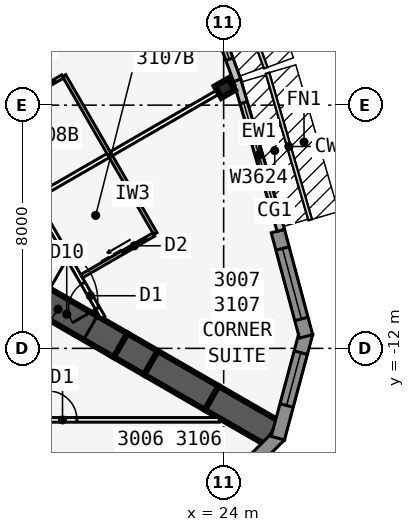
"""IFC4 building model, lengths in metres.
Left out: names, types, materials, properties, quantities, classifications, styles, units other than length and angle.
Written with IfcOpenShell. Run it as: python <this file> out.ifc"""

import sys

from ifc_helpers import new_model, si_unit, direction, frame, frame_2d, origin, origin_2d, place, context, subcontext, project, spatial, polyline, rectangle, i_section, outline, extrude, element, fill, save


model = new_model("IFC4")
c1 = context("Model", 3, precision=1e-05, world=origin(), true_north=direction((0.0, 1.0)))
c2 = subcontext(c1, "Body", "Model", "MODEL_VIEW")
j1 = project(units=[si_unit("LENGTHUNIT", "METRE"), si_unit("PLANEANGLEUNIT", "RADIAN")], contexts=[c1])
p1 = place(None, origin())
s1 = spatial("IfcSite", under=j1, at=p1, CompositionType="ELEMENT")
p2 = place(p1, origin())
s2 = spatial("IfcBuilding", under=s1, at=p2, CompositionType="ELEMENT")
p3 = place(p2, frame((0.0, 0.0, 118.1)))
s3 = spatial("IfcBuildingStorey", under=s2, at=p3, CompositionType="ELEMENT", Elevation=118.1)
p4 = place(p3, frame((16.5, -9.526, 0.0), z_axis=(0.0, 0.0, 1.0), x_axis=(0.866031398331, -0.499989616998, 0.0)))
e1 = element("IfcWall", 1, at=p4, inside=s3, PredefinedType="SHEAR", context=c2, shape_type="SweptSolid", body=[
    extrude(rectangle(XDim=4.746, YDim=0.9, at=frame_2d((2.373, 0.0))), origin(), (0.0, 0.0, 1.0), 3.4),
])
p5 = place(p4, frame((1.8, 0.0, 0.0)))
e2 = element("IfcOpeningElement", 2, at=p5, cuts=e1, PredefinedType="OPENING", context=c2, shape_type="SweptSolid", body=[
    extrude(rectangle(XDim=1.8, YDim=2.13, at=frame_2d((0.9, 1.065))), frame((0.0, 0.46, 0.0), z_axis=(0.0, -1.0, 0.0), x_axis=(1.0, 0.0, 0.0)), (0.0, 0.0, 1.0), 0.92),
])
p6 = place(p3, frame((20.61, -11.899, 0.0), z_axis=(0.0, 0.0, 1.0), x_axis=(0.866009537788, -0.500027479704, 0.0)))
e3 = element("IfcWall", 3, at=p6, inside=s3, PredefinedType="SHEAR", context=c2, shape_type="SweptSolid", body=[
    extrude(rectangle(XDim=1.155, YDim=0.9, at=frame_2d((0.577, 0.0))), origin(), (0.0, 0.0, 1.0), 3.4),
])
for number, where, z_axis, x_axis in (
    (4, (21.61, -12.477, 0.0), (0.0, 0.0, 1.0), (0.866, -0.5, 0.0)),
    (5, (23.61, -13.631, 0.0), (0.0, 0.0, 1.0), (0.866, -0.5, 0.0)),
):
    element("IfcWall", number, at=place(p3, frame(where, z_axis=z_axis, x_axis=x_axis)), inside=s3, PredefinedType="SHEAR", context=c2, shape_type="SweptSolid", body=[
        extrude(rectangle(XDim=2.309, YDim=0.9, at=frame_2d((1.155, 0.0))), origin(), (0.0, 0.0, 1.0), 3.4),
    ])
p7 = place(p3, frame((24.041, -3.44, 0.0), z_axis=(0.0, 0.0, 1.0), x_axis=(-0.5, 0.866025403784, 0.0)))
e6 = element("IfcColumn", 6, at=p7, inside=s3, PredefinedType="COLUMN", context=c2, shape_type="SweptSolid", body=[
    extrude(i_section(OverallWidth=0.437, OverallDepth=0.513, WebThickness=0.061, FlangeThickness=0.097, at=origin_2d()), origin(), (0.0, 0.0, 1.0), 3.4),
])
p8 = place(p3, frame((23.305, -17.388, 0.0), z_axis=(0.0, 0.0, 1.0), x_axis=(0.707106781187, 0.707106781187, 0.0)))
e7 = element("IfcWall", 7, at=p8, inside=s3, PredefinedType="SOLIDWALL", context=c2, shape_type="SweptSolid", body=[
    extrude(outline(polyline([(3.586, 0.225), (3.527, 0.225), (3.035, 0.093), (3.0, 0.225), (0.0, 0.225), (0.0, -0.225), (3.586, -0.225), (3.586, 0.225)])), origin(), (0.0, 0.0, 1.0), 3.235),
])
p9 = place(p8, frame((0.675, 0.0, 0.45)))
e8 = element("IfcOpeningElement", 8, at=p9, cuts=e7, PredefinedType="OPENING", context=c2, shape_type="SweptSolid", body=[
    extrude(rectangle(XDim=1.8, YDim=2.4, at=frame_2d((0.9, 1.2))), frame((0.0, 0.235, 0.0), z_axis=(0.0, -1.0, 0.0), x_axis=(1.0, 0.0, 0.0)), (0.0, 0.0, 1.0), 0.47),
])
p10 = place(p3, frame((25.783, -14.953, 0.0), z_axis=(0.0, 0.0, 1.0), x_axis=(0.258823421857, 0.965924653531, 0.0)))
e9 = element("IfcWall", 9, at=p10, inside=s3, PredefinedType="SOLIDWALL", context=c2, shape_type="SweptSolid", body=[
    extrude(outline(polyline([(3.586, 0.225), (0.586, 0.225), (0.551, 0.093), (0.06, 0.225), (0.0, 0.225), (0.0, -0.225), (3.586, -0.225), (3.586, 0.225)])), origin(), (0.0, 0.0, 1.0), 3.235),
])
p11 = place(p10, frame((1.111, 0.0, 0.45)))
e10 = element("IfcOpeningElement", 10, at=p11, cuts=e9, PredefinedType="OPENING", context=c2, shape_type="SweptSolid", body=[
    extrude(rectangle(XDim=1.8, YDim=2.4, at=frame_2d((0.9, 1.2))), frame((0.0, 0.235, 0.0), z_axis=(0.0, -1.0, 0.0), x_axis=(1.0, 0.0, 0.0)), (0.0, 0.0, 1.0), 0.47),
])
p12 = place(p3, frame((26.711, -11.605, 0.0), z_axis=(0.0, 0.0, 1.0), x_axis=(-0.258823421857, 0.965924653531, 0.0)))
e11 = element("IfcWall", 11, at=p12, inside=s3, PredefinedType="SOLIDWALL", context=c2, shape_type="SweptSolid", body=[
    extrude(rectangle(XDim=3.586, YDim=0.45, at=frame_2d((1.793, 0.0))), origin(), (0.0, 0.0, 1.0), 3.235),
])
p13 = place(p12, frame((0.593, 0.0, 0.45)))
e12 = element("IfcOpeningElement", 12, at=p13, cuts=e11, PredefinedType="OPENING", context=c2, shape_type="SweptSolid", body=[
    extrude(rectangle(XDim=2.4, YDim=2.4, at=frame_2d((1.2, 1.2))), frame((0.0, 0.235, 0.0), z_axis=(0.0, -1.0, 0.0), x_axis=(1.0, 0.0, 0.0)), (0.0, 0.0, 1.0), 0.47),
])
p14 = place(p3, frame((25.88, -8.118, 0.0), z_axis=(0.0, 0.0, 1.0), x_axis=(-0.279528287117, 0.960137457191, 0.0)))
e13 = element("IfcWall", 13, at=p14, inside=s3, PredefinedType="STANDARD", context=c2, shape_type="SweptSolid", body=[
    extrude(rectangle(XDim=5.148, YDim=0.25, at=frame_2d((2.574, 0.0))), origin(), (0.0, 0.0, 1.0), 3.235),
])
p15 = place(p14, frame((0.774, 0.0, 0.45)))
e14 = element("IfcOpeningElement", 14, at=p15, cuts=e13, PredefinedType="OPENING", context=c2, shape_type="SweptSolid", body=[
    extrude(rectangle(XDim=3.6, YDim=2.4, at=frame_2d((1.8, 1.2))), frame((0.0, 0.135, 0.0), z_axis=(0.0, -1.0, 0.0), x_axis=(1.0, 0.0, 0.0)), (0.0, 0.0, 1.0), 0.27),
])
p16 = place(p3, frame((24.444, -3.183, 0.0), z_axis=(0.0, 0.0, 1.0), x_axis=(-0.343225593282, 0.939252996863, 0.0)))
e15 = element("IfcWall", 15, at=p16, inside=s3, PredefinedType="STANDARD", context=c2, shape_type="SweptSolid", body=[
    extrude(rectangle(XDim=5.076, YDim=0.25, at=frame_2d((2.538, 0.0))), origin(), (0.0, 0.0, 1.0), 3.235),
])
p17 = place(p16, frame((0.738, 0.0, 0.45)))
e16 = element("IfcOpeningElement", 16, at=p17, cuts=e15, PredefinedType="OPENING", context=c2, shape_type="SweptSolid", body=[
    extrude(rectangle(XDim=3.6, YDim=2.4, at=frame_2d((1.8, 1.2))), frame((0.0, 0.135, 0.0), z_axis=(0.0, -1.0, 0.0), x_axis=(1.0, 0.0, 0.0)), (0.0, 0.0, 1.0), 0.27),
])
p18 = place(p3, frame((-23.857, -14.351, 0.0), z_axis=(0.0, 0.0, 1.0), x_axis=(1.0, 0.0, 0.0)))
e17 = element("IfcWall", 17, at=p18, inside=s3, PredefinedType="PARTITIONING", context=c2, shape_type="SweptSolid", body=[
    extrude(rectangle(XDim=47.714, YDim=0.15, at=frame_2d((23.857, 0.0))), origin(), (0.0, 0.0, 1.0), 3.235),
])
p19 = place(p18, frame((4.682, 0.0, 0.0)))
e18 = element("IfcOpeningElement", 18, at=p19, cuts=e17, PredefinedType="OPENING", context=c2, shape_type="SweptSolid", body=[
    extrude(rectangle(XDim=0.95, YDim=2.13, at=frame_2d((0.475, 1.065))), frame((0.0, 0.085, 0.0), z_axis=(0.0, -1.0, 0.0), x_axis=(1.0, 0.0, 0.0)), (0.0, 0.0, 1.0), 0.17),
])
p20 = place(p18, frame((11.482, 0.0, 0.0)))
e19 = element("IfcOpeningElement", 19, at=p20, cuts=e17, PredefinedType="OPENING", context=c2, shape_type="SweptSolid", body=[
    extrude(rectangle(XDim=0.95, YDim=2.13, at=frame_2d((0.475, 1.065))), frame((0.0, 0.085, 0.0), z_axis=(0.0, -1.0, 0.0), x_axis=(1.0, 0.0, 0.0)), (0.0, 0.0, 1.0), 0.17),
])
p21 = place(p18, frame((16.482, 0.0, 0.0)))
e20 = element("IfcOpeningElement", 20, at=p21, cuts=e17, PredefinedType="OPENING", context=c2, shape_type="SweptSolid", body=[
    extrude(rectangle(XDim=0.95, YDim=2.13, at=frame_2d((0.475, 1.065))), frame((0.0, 0.085, 0.0), z_axis=(0.0, -1.0, 0.0), x_axis=(1.0, 0.0, 0.0)), (0.0, 0.0, 1.0), 0.17),
])
p22 = place(p18, frame((21.482, 0.0, 0.0)))
e21 = element("IfcOpeningElement", 21, at=p22, cuts=e17, PredefinedType="OPENING", context=c2, shape_type="SweptSolid", body=[
    extrude(rectangle(XDim=0.95, YDim=2.13, at=frame_2d((0.475, 1.065))), frame((0.0, 0.085, 0.0), z_axis=(0.0, -1.0, 0.0), x_axis=(1.0, 0.0, 0.0)), (0.0, 0.0, 1.0), 0.17),
])
p23 = place(p18, frame((25.857, 0.0, 0.0)))
e22 = element("IfcOpeningElement", 22, at=p23, cuts=e17, PredefinedType="OPENING", context=c2, shape_type="SweptSolid", body=[
    extrude(rectangle(XDim=1.0, YDim=2.13, at=frame_2d((0.5, 1.065))), frame((0.0, 0.085, 0.0), z_axis=(0.0, -1.0, 0.0), x_axis=(1.0, 0.0, 0.0)), (0.0, 0.0, 1.0), 0.17),
])
p24 = place(p18, frame((32.082, 0.0, 0.0)))
e23 = element("IfcOpeningElement", 23, at=p24, cuts=e17, PredefinedType="OPENING", context=c2, shape_type="SweptSolid", body=[
    extrude(rectangle(XDim=0.95, YDim=2.13, at=frame_2d((0.475, 1.065))), frame((0.0, 0.085, 0.0), z_axis=(0.0, -1.0, 0.0), x_axis=(1.0, 0.0, 0.0)), (0.0, 0.0, 1.0), 0.17),
])
p25 = place(p18, frame((42.082, 0.0, 0.0)))
e24 = element("IfcOpeningElement", 24, at=p25, cuts=e17, PredefinedType="OPENING", context=c2, shape_type="SweptSolid", body=[
    extrude(rectangle(XDim=0.95, YDim=2.13, at=frame_2d((0.475, 1.065))), frame((0.0, 0.085, 0.0), z_axis=(0.0, -1.0, 0.0), x_axis=(1.0, 0.0, 0.0)), (0.0, 0.0, 1.0), 0.17),
])
p26 = place(p3, frame((20.027, -10.985, 0.0), z_axis=(0.0, 0.0, 1.0), x_axis=(-0.500001677587, 0.866024435227, 0.0)))
e25 = element("IfcWall", 25, at=p26, inside=s3, PredefinedType="PARTITIONING", context=c2, shape_type="SweptSolid", body=[
    extrude(rectangle(XDim=39.054, YDim=0.15, at=frame_2d((19.527, 0.0))), origin(), (0.0, 0.0, 1.0), 3.235),
])
p27 = place(p26, frame((0.352, 0.0, 0.0)))
e26 = element("IfcOpeningElement", 26, at=p27, cuts=e25, PredefinedType="OPENING", context=c2, shape_type="SweptSolid", body=[
    extrude(rectangle(XDim=0.95, YDim=2.13, at=frame_2d((0.475, 1.065))), frame((0.0, 0.085, 0.0), z_axis=(0.0, -1.0, 0.0), x_axis=(1.0, 0.0, 0.0)), (0.0, 0.0, 1.0), 0.17),
])
p28 = place(p26, frame((7.752, 0.0, 0.0)))
e27 = element("IfcOpeningElement", 27, at=p28, cuts=e25, PredefinedType="OPENING", context=c2, shape_type="SweptSolid", body=[
    extrude(rectangle(XDim=0.95, YDim=2.13, at=frame_2d((0.475, 1.065))), frame((0.0, 0.085, 0.0), z_axis=(0.0, -1.0, 0.0), x_axis=(1.0, 0.0, 0.0)), (0.0, 0.0, 1.0), 0.17),
])
p29 = place(p26, frame((17.752, 0.0, 0.0)))
e28 = element("IfcOpeningElement", 28, at=p29, cuts=e25, PredefinedType="OPENING", context=c2, shape_type="SweptSolid", body=[
    extrude(rectangle(XDim=0.95, YDim=2.13, at=frame_2d((0.475, 1.065))), frame((0.0, 0.085, 0.0), z_axis=(0.0, -1.0, 0.0), x_axis=(1.0, 0.0, 0.0)), (0.0, 0.0, 1.0), 0.17),
])
p30 = place(p26, frame((22.152, 0.0, 0.0)))
e29 = element("IfcOpeningElement", 29, at=p30, cuts=e25, PredefinedType="OPENING", context=c2, shape_type="SweptSolid", body=[
    extrude(rectangle(XDim=0.95, YDim=2.13, at=frame_2d((0.475, 1.065))), frame((0.0, 0.085, 0.0), z_axis=(0.0, -1.0, 0.0), x_axis=(1.0, 0.0, 0.0)), (0.0, 0.0, 1.0), 0.17),
])
p31 = place(p26, frame((27.152, 0.0, 0.0)))
e30 = element("IfcOpeningElement", 30, at=p31, cuts=e25, PredefinedType="OPENING", context=c2, shape_type="SweptSolid", body=[
    extrude(rectangle(XDim=0.95, YDim=2.13, at=frame_2d((0.475, 1.065))), frame((0.0, 0.085, 0.0), z_axis=(0.0, -1.0, 0.0), x_axis=(1.0, 0.0, 0.0)), (0.0, 0.0, 1.0), 0.17),
])
p32 = place(p26, frame((36.546, 0.0, 0.0)))
e31 = element("IfcOpeningElement", 31, at=p32, cuts=e25, PredefinedType="OPENING", context=c2, shape_type="SweptSolid", body=[
    extrude(rectangle(XDim=0.95, YDim=2.13, at=frame_2d((0.475, 1.065))), frame((0.0, 0.085, 0.0), z_axis=(0.0, -1.0, 0.0), x_axis=(1.0, 0.0, 0.0)), (0.0, 0.0, 1.0), 0.17),
])
p33 = place(p3, frame((17.829, -7.027, 0.0), z_axis=(0.0, 0.0, 1.0), x_axis=(0.866029804378, 0.499992377871, 0.0)))
e32 = element("IfcWall", 32, at=p33, inside=s3, PredefinedType="PARTITIONING", context=c2, shape_type="SweptSolid", body=[
    extrude(rectangle(XDim=7.516, YDim=0.15, at=frame_2d((3.758, 0.0))), origin(), (0.0, 0.0, 1.0), 2.389),
])
p34 = place(p3, frame((21.753, -8.225, 0.0), z_axis=(0.0, 0.0, 1.0), x_axis=(-0.499990139034, 0.866031096941, 0.0)))
e33 = element("IfcWall", 33, at=p34, inside=s3, PredefinedType="PLUMBINGWALL", context=c2, shape_type="SweptSolid", body=[
    extrude(rectangle(XDim=3.0, YDim=0.12, at=frame_2d((1.5, 0.0))), origin(), (0.0, 0.0, 1.0), 3.235),
])
p35 = place(p3, frame((19.329, -9.625, 0.0), z_axis=(0.0, 0.0, 1.0), x_axis=(0.866035715982, 0.499982138324, 0.0)))
e34 = element("IfcWall", 34, at=p35, inside=s3, PredefinedType="PLUMBINGWALL", context=c2, shape_type="SweptSolid", body=[
    extrude(rectangle(XDim=2.74, YDim=0.12, at=frame_2d((1.37, 0.0))), origin(), (0.0, 0.0, 1.0), 3.235),
])
p36 = place(p35, frame((1.55, 0.0, 0.0)))
e35 = element("IfcOpeningElement", 35, at=p36, cuts=e34, PredefinedType="OPENING", context=c2, shape_type="SweptSolid", body=[
    extrude(rectangle(XDim=0.9, YDim=2.13, at=frame_2d((0.45, 1.065))), frame((0.0, 0.07, 0.0), z_axis=(0.0, -1.0, 0.0), x_axis=(1.0, 0.0, 0.0)), (0.0, 0.0, 1.0), 0.14),
])
p37 = place(p3, frame((20.253, -5.627, 0.0), z_axis=(0.0, 0.0, 1.0), x_axis=(-0.50002537861, 0.866010750942, 0.0)))
e36 = element("IfcWall", 36, at=p37, inside=s3, PredefinedType="PLUMBINGWALL", context=c2, shape_type="SweptSolid", body=[
    extrude(rectangle(XDim=3.0, YDim=0.12, at=frame_2d((1.5, 0.0))), origin(), (0.0, 0.0, 1.0), 3.235),
])
p38 = place(p3, frame((16.329, -4.429, 0.0), z_axis=(0.0, 0.0, 1.0), x_axis=(0.865997131366, 0.500048966069, 0.0)))
e37 = element("IfcWall", 37, at=p38, inside=s3, PredefinedType="PLUMBINGWALL", context=c2, shape_type="SweptSolid", body=[
    extrude(rectangle(XDim=2.74, YDim=0.12, at=frame_2d((1.37, 0.0))), origin(), (0.0, 0.0, 1.0), 3.235),
])
p39 = place(p38, frame((1.55, 0.0, 0.0)))
e38 = element("IfcOpeningElement", 38, at=p39, cuts=e37, PredefinedType="OPENING", context=c2, shape_type="SweptSolid", body=[
    extrude(rectangle(XDim=0.9, YDim=2.13, at=frame_2d((0.45, 1.065))), frame((0.0, 0.07, 0.0), z_axis=(0.0, -1.0, 0.0), x_axis=(1.0, 0.0, 0.0)), (0.0, 0.0, 1.0), 0.14),
])
p40 = place(p11, origin())
e39 = element("IfcWindow", 39, at=p40, inside=s3, PartitioningType="SINGLE_PANEL", PredefinedType="WINDOW", context=c2, shape_type="SweptSolid", body=[
    extrude(rectangle(XDim=1.8, YDim=2.4, at=frame_2d((0.9, 1.2))), frame((0.0, 0.03, 0.0), z_axis=(0.0, -1.0, 0.0), x_axis=(1.0, 0.0, 0.0)), (0.0, 0.0, 1.0), 0.06),
])
fill(e10, e39)
p41 = place(p13, origin())
e40 = element("IfcWindow", 40, at=p41, inside=s3, PartitioningType="SINGLE_PANEL", PredefinedType="WINDOW", context=c2, shape_type="SweptSolid", body=[
    extrude(rectangle(XDim=2.4, YDim=2.4, at=frame_2d((1.2, 1.2))), frame((0.0, 0.03, 0.0), z_axis=(0.0, -1.0, 0.0), x_axis=(1.0, 0.0, 0.0)), (0.0, 0.0, 1.0), 0.06),
])
fill(e12, e40)
p42 = place(p15, origin())
e41 = element("IfcWindow", 41, at=p42, inside=s3, PartitioningType="SINGLE_PANEL", PredefinedType="WINDOW", context=c2, shape_type="SweptSolid", body=[
    extrude(rectangle(XDim=3.6, YDim=2.4, at=frame_2d((1.8, 1.2))), frame((0.0, 0.03, 0.0), z_axis=(0.0, -1.0, 0.0), x_axis=(1.0, 0.0, 0.0)), (0.0, 0.0, 1.0), 0.06),
])
fill(e14, e41)
p43 = place(p17, origin())
e42 = element("IfcWindow", 42, at=p43, inside=s3, PartitioningType="SINGLE_PANEL", PredefinedType="WINDOW", context=c2, shape_type="SweptSolid", body=[
    extrude(rectangle(XDim=3.6, YDim=2.4, at=frame_2d((1.8, 1.2))), frame((0.0, 0.03, 0.0), z_axis=(0.0, -1.0, 0.0), x_axis=(1.0, 0.0, 0.0)), (0.0, 0.0, 1.0), 0.06),
])
fill(e16, e42)
p44 = place(p25, origin())
e43 = element("IfcDoor", 43, at=p44, inside=s3, OperationType="SINGLE_SWING_LEFT", PredefinedType="DOOR", context=c2, shape_type="SweptSolid", body=[
    extrude(rectangle(XDim=0.95, YDim=2.13, at=frame_2d((0.475, 1.065))), frame((0.0, 0.025, 0.0), z_axis=(0.0, -1.0, 0.0), x_axis=(1.0, 0.0, 0.0)), (0.0, 0.0, 1.0), 0.05),
])
fill(e24, e43)
p45 = place(p36, origin())
e44 = element("IfcDoor", 44, at=p45, inside=s3, OperationType="SLIDING_TO_LEFT", PredefinedType="DOOR", context=c2, shape_type="SweptSolid", body=[
    extrude(rectangle(XDim=0.9, YDim=2.13, at=frame_2d((0.45, 1.065))), frame((0.0, 0.025, 0.0), z_axis=(0.0, -1.0, 0.0), x_axis=(1.0, 0.0, 0.0)), (0.0, 0.0, 1.0), 0.05),
])
fill(e35, e44)
p46 = place(p27, origin())
e45 = element("IfcDoor", 45, at=p46, inside=s3, OperationType="SINGLE_SWING_LEFT", PredefinedType="DOOR", context=c2, shape_type="SweptSolid", body=[
    extrude(rectangle(XDim=0.95, YDim=2.13, at=frame_2d((0.475, 1.065))), frame((0.0, 0.025, 0.0), z_axis=(0.0, -1.0, 0.0), x_axis=(1.0, 0.0, 0.0)), (0.0, 0.0, 1.0), 0.05),
])
fill(e26, e45)
p47 = place(p39, origin())
e46 = element("IfcDoor", 46, at=p47, inside=s3, OperationType="SLIDING_TO_LEFT", PredefinedType="DOOR", context=c2, shape_type="SweptSolid", body=[
    extrude(rectangle(XDim=0.9, YDim=2.13, at=frame_2d((0.45, 1.065))), frame((0.0, 0.025, 0.0), z_axis=(0.0, -1.0, 0.0), x_axis=(1.0, 0.0, 0.0)), (0.0, 0.0, 1.0), 0.05),
])
fill(e38, e46)
p48 = place(p5, origin())
e47 = element("IfcDoor", 47, at=p48, inside=s3, OperationType="DOUBLE_DOOR_DOUBLE_SWING", PredefinedType="DOOR", context=c2, shape_type="SweptSolid", body=[
    extrude(rectangle(XDim=1.8, YDim=2.13, at=frame_2d((0.9, 1.065))), frame((0.0, 0.025, 0.0), z_axis=(0.0, -1.0, 0.0), x_axis=(1.0, 0.0, 0.0)), (0.0, 0.0, 1.0), 0.05),
])
fill(e2, e47)
save(model, sys.argv[1])
